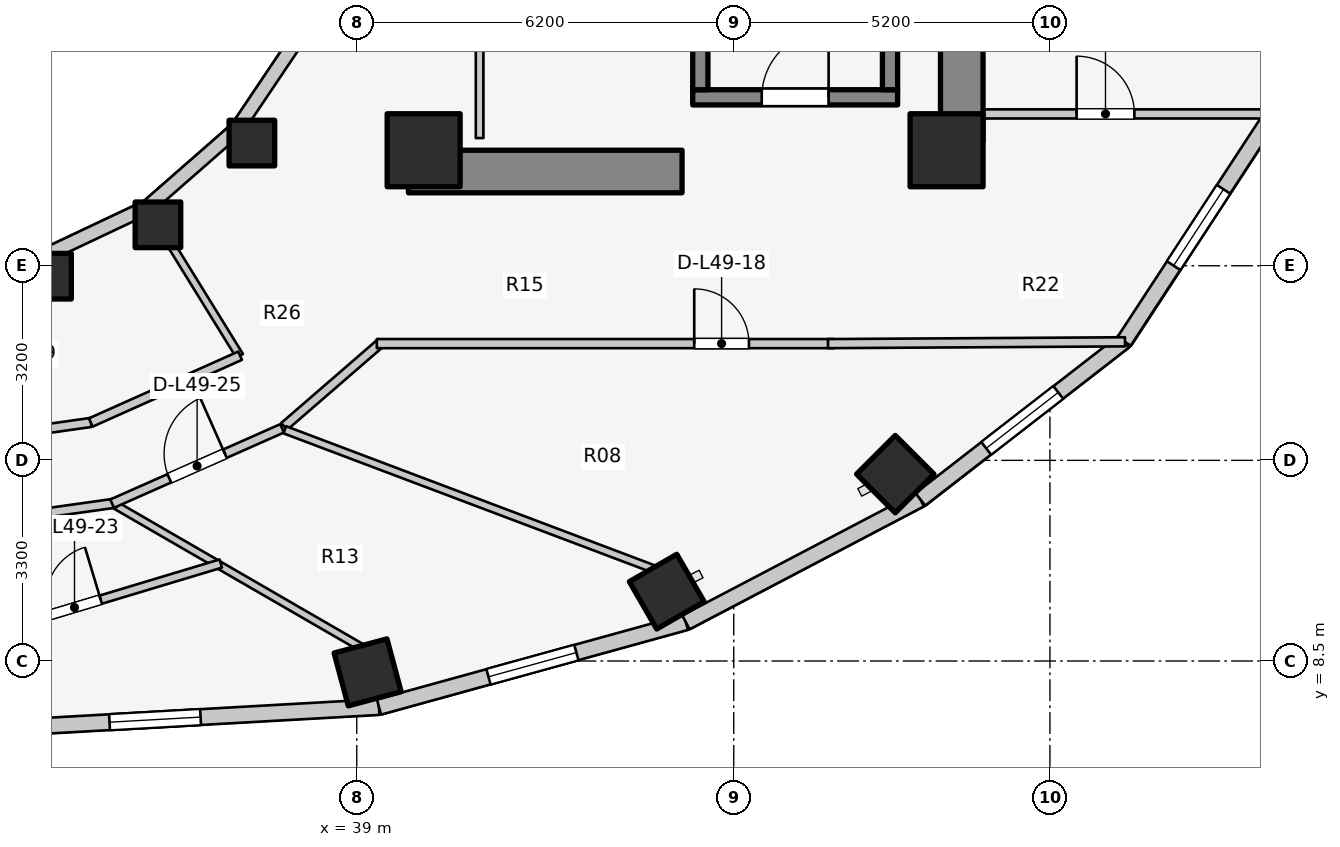
"""IFC4 building model, lengths in metres.
Left out: names, types, materials, properties, quantities, classifications, styles, units other than length and angle.
Written with IfcOpenShell. Run it as: python <this file> out.ifc"""

import sys

from ifc_helpers import new_model, si_unit, direction, frame, frame_2d, origin, origin_2d, place, context, subcontext, project, spatial, rectangle, extrude, element, fill, save


model = new_model("IFC4")
c1 = context("Model", 3, precision=1e-05, world=origin(), true_north=direction((0.0, 1.0)))
c2 = subcontext(c1, "Body", "Model", "MODEL_VIEW")
j1 = project(units=[si_unit("LENGTHUNIT", "METRE"), si_unit("PLANEANGLEUNIT", "RADIAN")], contexts=[c1])
p1 = place(None, origin())
s1 = spatial("IfcSite", under=j1, at=p1, CompositionType="ELEMENT")
p2 = place(p1, origin())
s2 = spatial("IfcBuilding", under=s1, at=p2, CompositionType="ELEMENT")
p3 = place(p2, frame((0.0, 0.0, 162.2)))
s3 = spatial("IfcBuildingStorey", under=s2, at=p3, CompositionType="ELEMENT", Elevation=162.2)
p4 = place(p3, frame((48.95, 17.05, 0.0), z_axis=(0.0, 0.0, 1.0), x_axis=(0.0, 1.0, 0.0)))
e1 = element("IfcWall", 1, at=p4, inside=s3, PredefinedType="SHEAR", context=c2, shape_type="SweptSolid", body=[
    extrude(rectangle(XDim=12.8, YDim=0.7, at=frame_2d((6.4, 0.0))), origin(), (0.0, 0.0, 1.0), 3.1),
])
p5 = place(p3, frame((39.85, 16.55, 0.0), z_axis=(0.0, 0.0, 1.0), x_axis=(1.0, 0.0, 0.0)))
e2 = element("IfcWall", 2, at=p5, inside=s3, PredefinedType="SHEAR", context=c2, shape_type="SweptSolid", body=[
    extrude(rectangle(XDim=4.5, YDim=0.7, at=frame_2d((2.25, 0.0))), origin(), (0.0, 0.0, 1.0), 3.1),
])
p6 = place(p3, frame((44.525, 17.77, 0.0), z_axis=(0.0, 0.0, 1.0), x_axis=(1.0, 0.0, 0.0)))
e3 = element("IfcWall", 3, at=p6, inside=s3, PredefinedType="SOLIDWALL", context=c2, shape_type="SweptSolid", body=[
    extrude(rectangle(XDim=3.37, YDim=0.25, at=frame_2d((1.685, 0.0))), origin(), (0.0, 0.0, 1.0), 3.1),
])
p7 = place(p6, frame((1.135, 0.0, 0.0)))
e4 = element("IfcOpeningElement", 4, at=p7, cuts=e3, PredefinedType="OPENING", context=c2, shape_type="SweptSolid", body=[
    extrude(rectangle(XDim=1.1, YDim=2.1, at=frame_2d((0.55, 1.05))), frame((0.0, 0.135, 0.0), z_axis=(0.0, -1.0, 0.0), x_axis=(1.0, 0.0, 0.0)), (0.0, 0.0, 1.0), 0.27),
])
for number, where, z_axis, x_axis in (
    (5, (44.65, 17.895, 0.0), (0.0, 0.0, 1.0), (0.0, 1.0, 0.0)),
    (6, (47.77, 17.895, 0.0), (0.0, 0.0, 1.0), (0.0, 1.0, 0.0)),
):
    element("IfcWall", number, at=place(p3, frame(where, z_axis=z_axis, x_axis=x_axis)), inside=s3, PredefinedType="SOLIDWALL", context=c2, shape_type="SweptSolid", body=[
        extrude(rectangle(XDim=7.81, YDim=0.25, at=frame_2d((3.905, 0.0))), origin(), (0.0, 0.0, 1.0), 3.1),
    ])
for number, where, z_axis, x_axis in (
    (7, (40.1, 16.9, 0.0), (0.0, 0.0, 1.0), (1.0, 0.0, 0.0)),
    (8, (48.7, 16.9, 0.0), (0.0, 0.0, 1.0), (1.0, 0.0, 0.0)),
):
    element("IfcColumn", number, at=place(p3, frame(where, z_axis=z_axis, x_axis=x_axis)), inside=s3, PredefinedType="COLUMN", context=c2, shape_type="SweptSolid", body=[
        extrude(rectangle(XDim=1.2, YDim=1.2, at=origin_2d()), origin(), (0.0, 0.0, 1.0), 3.1),
    ])
p8 = place(p3, frame((33.931, 14.828, 0.0), z_axis=(0.0, 0.0, 1.0), x_axis=(1.0, 0.0, 0.0)))
e9 = element("IfcColumn", 9, at=p8, inside=s3, PredefinedType="COLUMN", context=c2, shape_type="SweptSolid", body=[
    extrude(rectangle(XDim=0.75, YDim=0.75, at=origin_2d()), origin(), (0.0, 0.0, 1.0), 3.1),
])
p9 = place(p3, frame((39.178, 8.313, 0.0), z_axis=(0.0, 0.0, 1.0), x_axis=(0.258819045103, -0.965925826289, 0.0)))
e10 = element("IfcColumn", 10, at=p9, inside=s3, PredefinedType="COLUMN", context=c2, shape_type="SweptSolid", body=[
    extrude(rectangle(XDim=0.9, YDim=0.9, at=origin_2d()), origin(), (0.0, 0.0, 1.0), 3.1),
])
p10 = place(p3, frame((35.73, 15.673, 0.0), z_axis=(0.0, 0.0, 1.0), x_axis=(1.0, 0.0, 0.0)))
e11 = element("IfcColumn", 11, at=p10, inside=s3, PredefinedType="COLUMN", context=c2, shape_type="SweptSolid", body=[
    extrude(rectangle(XDim=0.75, YDim=0.75, at=origin_2d()), origin(), (0.0, 0.0, 1.0), 3.1),
])
p11 = place(p3, frame((44.098, 9.641, 0.0), z_axis=(0.0, 0.0, 1.0), x_axis=(0.5, -0.866025403784, 0.0)))
e12 = element("IfcColumn", 12, at=p11, inside=s3, PredefinedType="COLUMN", context=c2, shape_type="SweptSolid", body=[
    extrude(rectangle(XDim=0.9, YDim=0.9, at=origin_2d()), origin(), (0.0, 0.0, 1.0), 3.1),
])
p12 = place(p3, frame((37.275, 17.018, 0.0), z_axis=(0.0, 0.0, 1.0), x_axis=(1.0, 0.0, 0.0)))
e13 = element("IfcColumn", 13, at=p12, inside=s3, PredefinedType="COLUMN", context=c2, shape_type="SweptSolid", body=[
    extrude(rectangle(XDim=0.75, YDim=0.75, at=origin_2d()), origin(), (0.0, 0.0, 1.0), 3.1),
])
p13 = place(p3, frame((47.857, 11.573, 0.0), z_axis=(0.0, 0.0, 1.0), x_axis=(0.707106781187, -0.707106781187, 0.0)))
e14 = element("IfcColumn", 14, at=p13, inside=s3, PredefinedType="COLUMN", context=c2, shape_type="SweptSolid", body=[
    extrude(rectangle(XDim=0.9, YDim=0.9, at=origin_2d()), origin(), (0.0, 0.0, 1.0), 3.1),
])
p14 = place(p3, frame((33.843, 15.157, 0.0), z_axis=(0.0, 0.0, 1.0), x_axis=(0.904179699603, 0.427152280606, 0.0)))
e15 = element("IfcWall", 15, at=p14, inside=s3, PredefinedType="STANDARD", context=c2, shape_type="SweptSolid", body=[
    extrude(rectangle(XDim=1.899, YDim=0.23, at=frame_2d((0.95, 0.0))), origin(), (0.0, 0.0, 1.0), 2.16),
])
p15 = place(p3, frame((35.56, 15.968, 0.0), z_axis=(0.0, 0.0, 1.0), x_axis=(0.752576694707, 0.658504607869, 0.0)))
e16 = element("IfcWall", 16, at=p15, inside=s3, PredefinedType="STANDARD", context=c2, shape_type="SweptSolid", body=[
    extrude(rectangle(XDim=1.959, YDim=0.23, at=frame_2d((0.98, 0.0))), origin(), (0.0, 0.0, 1.0), 2.16),
])
p16 = place(p3, frame((37.035, 17.258, 0.0), z_axis=(0.0, 0.0, 1.0), x_axis=(0.558197800898, 0.829707909492, 0.0)))
e17 = element("IfcWall", 17, at=p16, inside=s3, PredefinedType="STANDARD", context=c2, shape_type="SweptSolid", body=[
    extrude(rectangle(XDim=2.027, YDim=0.23, at=frame_2d((1.013, 0.0))), origin(), (0.0, 0.0, 1.0), 2.16),
])
p17 = place(p3, frame((32.0, 7.329, 0.0), z_axis=(0.0, 0.0, 1.0), x_axis=(0.998417906562, 0.056228852534, 0.0)))
e18 = element("IfcWall", 18, at=p17, inside=s3, PredefinedType="STANDARD", context=c2, shape_type="SweptSolid", body=[
    extrude(rectangle(XDim=7.377, YDim=0.26, at=frame_2d((3.688, 0.0))), origin(), (0.0, 0.0, 1.0), 2.85),
])
p18 = place(p17, frame((2.938, 0.0, 0.75)))
e19 = element("IfcOpeningElement", 19, at=p18, cuts=e18, PredefinedType="OPENING", context=c2, shape_type="SweptSolid", body=[
    extrude(rectangle(XDim=1.5, YDim=1.6, at=frame_2d((0.75, 0.8))), frame((0.0, 0.14, 0.0), z_axis=(0.0, -1.0, 0.0), x_axis=(1.0, 0.0, 0.0)), (0.0, 0.0, 1.0), 0.28),
])
p19 = place(p3, frame((39.365, 7.743, 0.0), z_axis=(0.0, 0.0, 1.0), x_axis=(0.963953455704, 0.26607092144, 0.0)))
e20 = element("IfcWall", 20, at=p19, inside=s3, PredefinedType="STANDARD", context=c2, shape_type="SweptSolid", body=[
    extrude(rectangle(XDim=5.237, YDim=0.26, at=frame_2d((2.618, 0.0))), origin(), (0.0, 0.0, 1.0), 2.85),
])
p20 = place(p19, frame((1.868, 0.0, 0.75)))
e21 = element("IfcOpeningElement", 21, at=p20, cuts=e20, PredefinedType="OPENING", context=c2, shape_type="SweptSolid", body=[
    extrude(rectangle(XDim=1.5, YDim=1.6, at=frame_2d((0.75, 0.8))), frame((0.0, 0.14, 0.0), z_axis=(0.0, -1.0, 0.0), x_axis=(1.0, 0.0, 0.0)), (0.0, 0.0, 1.0), 0.28),
])
p21 = place(p3, frame((44.413, 9.137, 0.0), z_axis=(0.0, 0.0, 1.0), x_axis=(0.885660265226, 0.464333818065, 0.0)))
e22 = element("IfcWall", 22, at=p21, inside=s3, PredefinedType="STANDARD", context=c2, shape_type="SweptSolid", body=[
    extrude(rectangle(XDim=4.354, YDim=0.26, at=frame_2d((2.177, 0.0))), origin(), (0.0, 0.0, 1.0), 2.85),
])
p22 = place(p3, frame((48.269, 11.158, 0.0), z_axis=(0.0, 0.0, 1.0), x_axis=(0.790185650662, 0.612867552973, 0.0)))
e23 = element("IfcWall", 23, at=p22, inside=s3, PredefinedType="STANDARD", context=c2, shape_type="SweptSolid", body=[
    extrude(rectangle(XDim=4.239, YDim=0.26, at=frame_2d((2.12, 0.0))), origin(), (0.0, 0.0, 1.0), 2.85),
])
p23 = place(p22, frame((1.37, 0.0, 0.75)))
e24 = element("IfcOpeningElement", 24, at=p23, cuts=e23, PredefinedType="OPENING", context=c2, shape_type="SweptSolid", body=[
    extrude(rectangle(XDim=1.5, YDim=1.6, at=frame_2d((0.75, 0.8))), frame((0.0, 0.14, 0.0), z_axis=(0.0, -1.0, 0.0), x_axis=(1.0, 0.0, 0.0)), (0.0, 0.0, 1.0), 0.28),
])
p24 = place(p3, frame((51.619, 13.757, 0.0), z_axis=(0.0, 0.0, 1.0), x_axis=(0.547456494366, 0.836834145322, 0.0)))
e25 = element("IfcWall", 25, at=p24, inside=s3, PredefinedType="STANDARD", context=c2, shape_type="SweptSolid", body=[
    extrude(rectangle(XDim=4.477, YDim=0.26, at=frame_2d((2.239, 0.0))), origin(), (0.0, 0.0, 1.0), 2.85),
])
p25 = place(p24, frame((1.489, 0.0, 0.75)))
e26 = element("IfcOpeningElement", 26, at=p25, cuts=e25, PredefinedType="OPENING", context=c2, shape_type="SweptSolid", body=[
    extrude(rectangle(XDim=1.5, YDim=1.6, at=frame_2d((0.75, 0.8))), frame((0.0, 0.14, 0.0), z_axis=(0.0, -1.0, 0.0), x_axis=(1.0, 0.0, 0.0)), (0.0, 0.0, 1.0), 0.28),
])
p26 = place(p3, frame((41.02, 17.1, 0.0), z_axis=(0.0, 0.0, 1.0), x_axis=(0.0, 1.0, 0.0)))
e27 = element("IfcWall", 27, at=p26, inside=s3, PredefinedType="PARTITIONING", context=c2, shape_type="SweptSolid", body=[
    extrude(rectangle(XDim=2.04, YDim=0.125, at=frame_2d((1.02, 0.0))), origin(), (0.0, 0.0, 1.0), 2.855),
])
p27 = place(p3, frame((48.95, 17.497, 0.0), z_axis=(0.0, 0.0, 1.0), x_axis=(1.0, 0.0, 0.0)))
e28 = element("IfcWall", 28, at=p27, inside=s3, PredefinedType="PARTITIONING", context=c2, shape_type="SweptSolid", body=[
    extrude(rectangle(XDim=5.14, YDim=0.15, at=frame_2d((2.57, 0.0))), origin(), (0.0, 0.0, 1.0), 2.855),
])
p28 = place(p27, frame((1.889, 0.0, 0.0)))
e29 = element("IfcOpeningElement", 29, at=p28, cuts=e28, PredefinedType="OPENING", context=c2, shape_type="SweptSolid", body=[
    extrude(rectangle(XDim=0.95, YDim=2.1, at=frame_2d((0.475, 1.05))), frame((0.0, 0.085, 0.0), z_axis=(0.0, -1.0, 0.0), x_axis=(1.0, 0.0, 0.0)), (0.0, 0.0, 1.0), 0.17),
])
p29 = place(p3, frame((37.807, 12.358, 0.0), z_axis=(0.0, 0.0, 1.0), x_axis=(0.756055312247, 0.654507727092, 0.0)))
e30 = element("IfcWall", 30, at=p29, inside=s3, PredefinedType="PARTITIONING", context=c2, shape_type="SweptSolid", body=[
    extrude(rectangle(XDim=2.111, YDim=0.15, at=frame_2d((1.055, 0.0))), origin(), (0.0, 0.0, 1.0), 2.299),
])
p30 = place(p3, frame((39.33, 13.72, 0.0), z_axis=(0.0, 0.0, 1.0), x_axis=(1.0, 0.0, 0.0)))
e31 = element("IfcWall", 31, at=p30, inside=s3, PredefinedType="PARTITIONING", context=c2, shape_type="SweptSolid", body=[
    extrude(rectangle(XDim=7.52, YDim=0.15, at=frame_2d((3.76, 0.0))), origin(), (0.0, 0.0, 1.0), 2.299),
])
p31 = place(p30, frame((5.22, 0.0, 0.0)))
e32 = element("IfcOpeningElement", 32, at=p31, cuts=e31, PredefinedType="OPENING", context=c2, shape_type="SweptSolid", body=[
    extrude(rectangle(XDim=0.9, YDim=2.1, at=frame_2d((0.45, 1.05))), frame((0.0, 0.085, 0.0), z_axis=(0.0, -1.0, 0.0), x_axis=(1.0, 0.0, 0.0)), (0.0, 0.0, 1.0), 0.17),
])
p32 = place(p3, frame((46.75, 13.72, 0.0), z_axis=(0.0, 0.0, 1.0), x_axis=(0.999981712056, 0.006047772638, 0.0)))
e33 = element("IfcWall", 33, at=p32, inside=s3, PredefinedType="PARTITIONING", context=c2, shape_type="SweptSolid", body=[
    extrude(rectangle(XDim=4.885, YDim=0.15, at=frame_2d((2.442, 0.0))), origin(), (0.0, 0.0, 1.0), 2.22),
])
p33 = place(p3, frame((35.55, 15.985, 0.0), z_axis=(0.0, 0.0, 1.0), x_axis=(0.525627246902, -0.850714991824, 0.0)))
e34 = element("IfcWall", 34, at=p33, inside=s3, PredefinedType="PARTITIONING", context=c2, shape_type="SweptSolid", body=[
    extrude(rectangle(XDim=2.901, YDim=0.125, at=frame_2d((1.451, 0.0))), origin(), (0.0, 0.0, 1.0), 2.299),
])
p34 = place(p3, frame((31.998, 12.05, 0.0), z_axis=(0.0, 0.0, 1.0), x_axis=(0.990066775667, 0.1405979364, 0.0)))
e35 = element("IfcWall", 35, at=p34, inside=s3, PredefinedType="PARTITIONING", context=c2, shape_type="SweptSolid", body=[
    extrude(rectangle(XDim=2.657, YDim=0.15, at=frame_2d((1.328, 0.0))), origin(), (0.0, 0.0, 1.0), 2.299),
])
p35 = place(p34, frame((0.854, 0.0, 0.0)))
e36 = element("IfcOpeningElement", 36, at=p35, cuts=e35, PredefinedType="OPENING", context=c2, shape_type="SweptSolid", body=[
    extrude(rectangle(XDim=0.95, YDim=2.1, at=frame_2d((0.475, 1.05))), frame((0.0, 0.085, 0.0), z_axis=(0.0, -1.0, 0.0), x_axis=(1.0, 0.0, 0.0)), (0.0, 0.0, 1.0), 0.17),
])
p36 = place(p3, frame((34.625, 12.423, 0.0), z_axis=(0.0, 0.0, 1.0), x_axis=(0.912888568324, 0.408208845842, 0.0)))
e37 = element("IfcWall", 37, at=p36, inside=s3, PredefinedType="PARTITIONING", context=c2, shape_type="SweptSolid", body=[
    extrude(rectangle(XDim=2.69, YDim=0.15, at=frame_2d((1.345, 0.0))), origin(), (0.0, 0.0, 1.0), 2.299),
])
p37 = place(p3, frame((35.032, 11.062, 0.0), z_axis=(0.0, 0.0, 1.0), x_axis=(0.865627016774, -0.500689392568, 0.0)))
e38 = element("IfcWall", 38, at=p37, inside=s3, PredefinedType="PARTITIONING", context=c2, shape_type="SweptSolid", body=[
    extrude(rectangle(XDim=4.662, YDim=0.125, at=frame_2d((2.331, 0.0))), origin(), (0.0, 0.0, 1.0), 2.299),
])
p38 = place(p3, frame((37.816, 12.302, 0.0), z_axis=(0.0, 0.0, 1.0), x_axis=(0.935601484289, -0.353057874288, 0.0)))
e39 = element("IfcWall", 39, at=p38, inside=s3, PredefinedType="PARTITIONING", context=c2, shape_type="SweptSolid", body=[
    extrude(rectangle(XDim=6.484, YDim=0.125, at=frame_2d((3.242, 0.0))), origin(), (0.0, 0.0, 1.0), 2.299),
])
p39 = place(p3, frame((31.95, 10.663, 0.0), z_axis=(0.0, 0.0, 1.0), x_axis=(0.990234434447, 0.139412211929, 0.0)))
e40 = element("IfcWall", 40, at=p39, inside=s3, PredefinedType="PARTITIONING", context=c2, shape_type="SweptSolid", body=[
    extrude(rectangle(XDim=3.114, YDim=0.15, at=frame_2d((1.557, 0.0))), origin(), (0.0, 0.0, 1.0), 2.299),
])
p40 = place(p3, frame((31.952, 8.656, 0.0), z_axis=(0.0, 0.0, 1.0), x_axis=(0.957599969859, 0.28810119355, 0.0)))
e41 = element("IfcWall", 41, at=p40, inside=s3, PredefinedType="PLUMBINGWALL", context=c2, shape_type="SweptSolid", body=[
    extrude(rectangle(XDim=5.024, YDim=0.14, at=frame_2d((2.512, 0.0))), origin(), (0.0, 0.0, 1.0), 2.299),
])
p41 = place(p40, frame((2.062, 0.0, 0.0)))
e42 = element("IfcOpeningElement", 42, at=p41, cuts=e41, PredefinedType="OPENING", context=c2, shape_type="SweptSolid", body=[
    extrude(rectangle(XDim=0.9, YDim=2.1, at=frame_2d((0.45, 1.05))), frame((0.0, 0.08, 0.0), z_axis=(0.0, -1.0, 0.0), x_axis=(1.0, 0.0, 0.0)), (0.0, 0.0, 1.0), 0.16),
])
p42 = place(p3, frame((34.976, 11.088, 0.0), z_axis=(0.0, 0.0, 1.0), x_axis=(0.914324470734, 0.404982422108, 0.0)))
e43 = element("IfcWall", 43, at=p42, inside=s3, PredefinedType="PARTITIONING", context=c2, shape_type="SweptSolid", body=[
    extrude(rectangle(XDim=3.058, YDim=0.15, at=frame_2d((1.529, 0.0))), origin(), (0.0, 0.0, 1.0), 2.299),
])
p43 = place(p42, frame((1.029, 0.0, 0.0)))
e44 = element("IfcOpeningElement", 44, at=p43, cuts=e43, PredefinedType="OPENING", context=c2, shape_type="SweptSolid", body=[
    extrude(rectangle(XDim=1.0, YDim=2.1, at=frame_2d((0.5, 1.05))), frame((0.0, 0.085, 0.0), z_axis=(0.0, -1.0, 0.0), x_axis=(1.0, 0.0, 0.0)), (0.0, 0.0, 1.0), 0.17),
])
p44 = place(p18, origin())
e45 = element("IfcWindow", 45, at=p44, inside=s3, PartitioningType="SINGLE_PANEL", PredefinedType="WINDOW", context=c2, shape_type="SweptSolid", body=[
    extrude(rectangle(XDim=1.5, YDim=1.6, at=frame_2d((0.75, 0.8))), frame((0.0, 0.03, 0.0), z_axis=(0.0, -1.0, 0.0), x_axis=(1.0, 0.0, 0.0)), (0.0, 0.0, 1.0), 0.06),
])
fill(e19, e45)
p45 = place(p20, origin())
e46 = element("IfcWindow", 46, at=p45, inside=s3, PartitioningType="SINGLE_PANEL", PredefinedType="WINDOW", context=c2, shape_type="SweptSolid", body=[
    extrude(rectangle(XDim=1.5, YDim=1.6, at=frame_2d((0.75, 0.8))), frame((0.0, 0.03, 0.0), z_axis=(0.0, -1.0, 0.0), x_axis=(1.0, 0.0, 0.0)), (0.0, 0.0, 1.0), 0.06),
])
fill(e21, e46)
p46 = place(p23, origin())
e47 = element("IfcWindow", 47, at=p46, inside=s3, PartitioningType="SINGLE_PANEL", PredefinedType="WINDOW", context=c2, shape_type="SweptSolid", body=[
    extrude(rectangle(XDim=1.5, YDim=1.6, at=frame_2d((0.75, 0.8))), frame((0.0, 0.03, 0.0), z_axis=(0.0, -1.0, 0.0), x_axis=(1.0, 0.0, 0.0)), (0.0, 0.0, 1.0), 0.06),
])
fill(e24, e47)
p47 = place(p25, origin())
e48 = element("IfcWindow", 48, at=p47, inside=s3, PartitioningType="SINGLE_PANEL", PredefinedType="WINDOW", context=c2, shape_type="SweptSolid", body=[
    extrude(rectangle(XDim=1.5, YDim=1.6, at=frame_2d((0.75, 0.8))), frame((0.0, 0.03, 0.0), z_axis=(0.0, -1.0, 0.0), x_axis=(1.0, 0.0, 0.0)), (0.0, 0.0, 1.0), 0.06),
])
fill(e26, e48)
p48 = place(p7, origin())
e49 = element("IfcDoor", 49, at=p48, inside=s3, OperationType="SINGLE_SWING_RIGHT", PredefinedType="DOOR", context=c2, shape_type="SweptSolid", body=[
    extrude(rectangle(XDim=1.1, YDim=2.1, at=frame_2d((0.55, 1.05))), frame((0.0, 0.025, 0.0), z_axis=(0.0, -1.0, 0.0), x_axis=(1.0, 0.0, 0.0)), (0.0, 0.0, 1.0), 0.05),
])
fill(e4, e49)
p49 = place(p28, origin())
e50 = element("IfcDoor", 50, at=p49, inside=s3, OperationType="SINGLE_SWING_LEFT", PredefinedType="DOOR", context=c2, shape_type="SweptSolid", body=[
    extrude(rectangle(XDim=0.95, YDim=2.1, at=frame_2d((0.475, 1.05))), frame((0.0, 0.025, 0.0), z_axis=(0.0, -1.0, 0.0), x_axis=(1.0, 0.0, 0.0)), (0.0, 0.0, 1.0), 0.05),
])
fill(e29, e50)
p50 = place(p31, origin())
e51 = element("IfcDoor", 51, at=p50, inside=s3, OperationType="SINGLE_SWING_LEFT", PredefinedType="DOOR", context=c2, shape_type="SweptSolid", body=[
    extrude(rectangle(XDim=0.9, YDim=2.1, at=frame_2d((0.45, 1.05))), frame((0.0, 0.025, 0.0), z_axis=(0.0, -1.0, 0.0), x_axis=(1.0, 0.0, 0.0)), (0.0, 0.0, 1.0), 0.05),
])
fill(e32, e51)
p51 = place(p41, origin())
e52 = element("IfcDoor", 52, at=p51, inside=s3, OperationType="SINGLE_SWING_RIGHT", PredefinedType="DOOR", context=c2, shape_type="SweptSolid", body=[
    extrude(rectangle(XDim=0.9, YDim=2.1, at=frame_2d((0.45, 1.05))), frame((0.0, 0.025, 0.0), z_axis=(0.0, -1.0, 0.0), x_axis=(1.0, 0.0, 0.0)), (0.0, 0.0, 1.0), 0.05),
])
fill(e42, e52)
p52 = place(p43, origin())
e53 = element("IfcDoor", 53, at=p52, inside=s3, OperationType="SINGLE_SWING_RIGHT", PredefinedType="DOOR", context=c2, shape_type="SweptSolid", body=[
    extrude(rectangle(XDim=1.0, YDim=2.1, at=frame_2d((0.5, 1.05))), frame((0.0, 0.025, 0.0), z_axis=(0.0, -1.0, 0.0), x_axis=(1.0, 0.0, 0.0)), (0.0, 0.0, 1.0), 0.05),
])
fill(e44, e53)
save(model, sys.argv[1])
